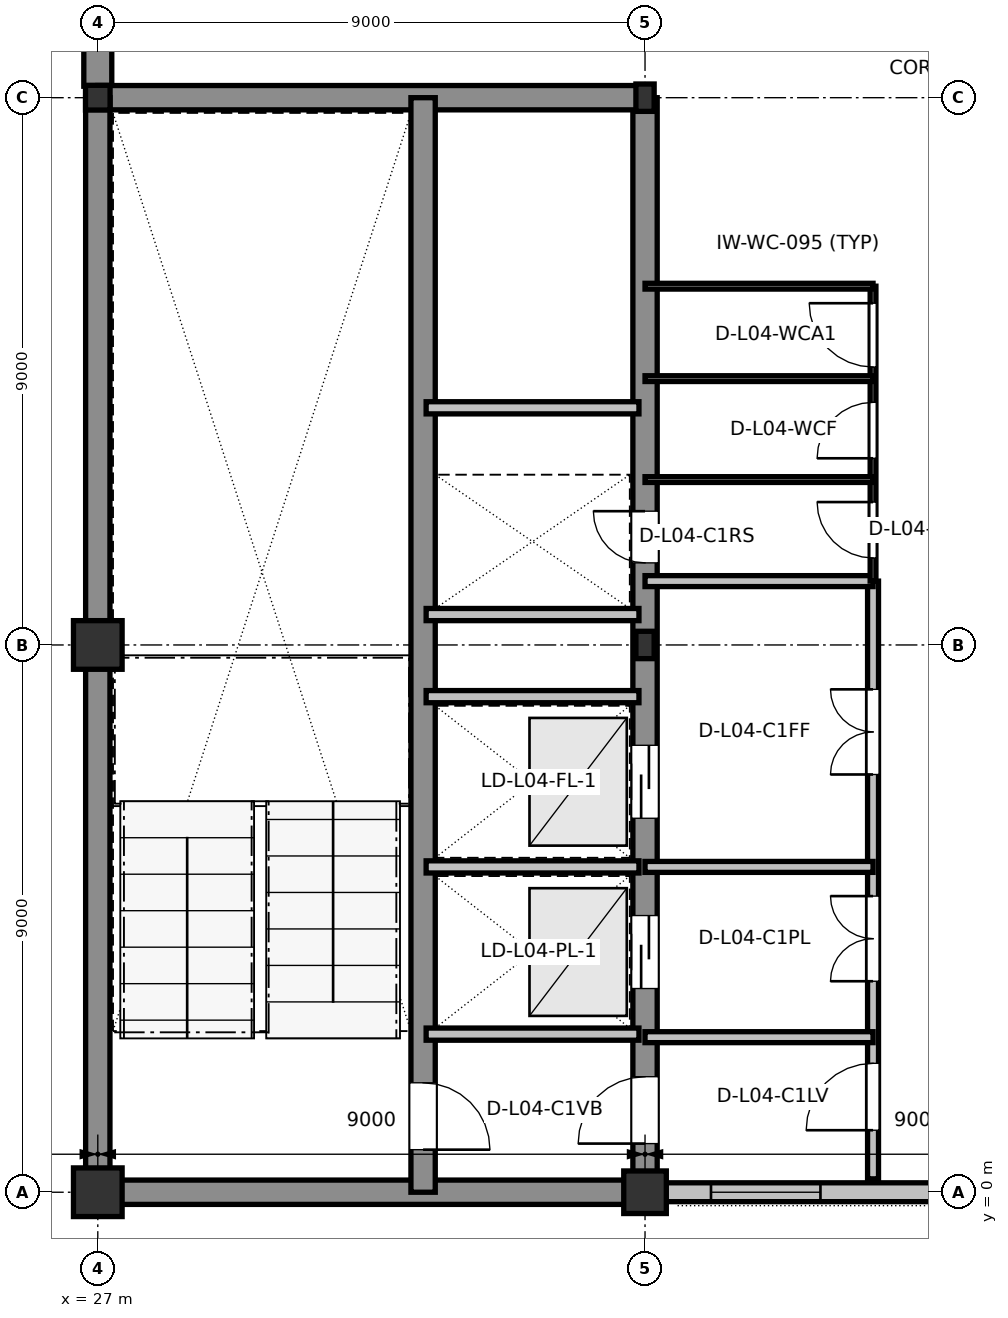
"""IFC4 building model, lengths in metres.
Left out: names, types, materials, properties, quantities, classifications, styles, units other than length and angle.
Written with IfcOpenShell. Run it as: python <this file> out.ifc"""

import sys

from ifc_helpers import new_model, si_unit, direction, frame, frame_2d, origin, origin_2d, place, context, subcontext, project, spatial, rectangle, i_section, extrude, element, fill, save


model = new_model("IFC4")
c1 = context("Model", 3, precision=1e-05, world=origin(), true_north=direction((0.0, 1.0)))
c2 = subcontext(c1, "Body", "Model", "MODEL_VIEW")
j1 = project(units=[si_unit("LENGTHUNIT", "METRE"), si_unit("PLANEANGLEUNIT", "RADIAN")], contexts=[c1])
p1 = place(None, origin())
s1 = spatial("IfcSite", under=j1, at=p1, CompositionType="ELEMENT")
p2 = place(p1, origin())
s2 = spatial("IfcBuilding", under=s1, at=p2, CompositionType="ELEMENT")
p3 = place(p2, frame((0.0, 0.0, 19.2)))
s3 = spatial("IfcBuildingStorey", under=s2, at=p3, CompositionType="ELEMENT", Elevation=19.2)
for number, where, z_axis, x_axis in (
    (1, (27.0, 0.0, 0.0), (0.0, 0.0, 1.0), (1.0, 0.0, 0.0)),
    (2, (27.0, 9.0, 0.0), (0.0, 0.0, 1.0), (1.0, 0.0, 0.0)),
):
    element("IfcColumn", number, at=place(p3, frame(where, z_axis=z_axis, x_axis=x_axis)), inside=s3, PredefinedType="COLUMN", context=c2, shape_type="SweptSolid", body=[
        extrude(rectangle(XDim=0.8, YDim=0.8, at=origin_2d()), origin(), (0.0, 0.0, 1.0), 4.2),
    ])
p4 = place(p3, frame((27.0, 18.0, 0.0), z_axis=(0.0, 0.0, 1.0), x_axis=(1.0, 0.0, 0.0)))
e3 = element("IfcColumn", 3, at=p4, inside=s3, PredefinedType="COLUMN", context=c2, shape_type="SweptSolid", body=[
    extrude(i_section(OverallWidth=0.404, OverallDepth=0.407, WebThickness=0.018, FlangeThickness=0.027, at=origin_2d()), origin(), (0.0, 0.0, 1.0), 4.2),
])
p5 = place(p3, frame((36.0, 0.0, 0.0), z_axis=(0.0, 0.0, 1.0), x_axis=(1.0, 0.0, 0.0)))
e4 = element("IfcColumn", 4, at=p5, inside=s3, PredefinedType="COLUMN", context=c2, shape_type="SweptSolid", body=[
    extrude(rectangle(XDim=0.7, YDim=0.7, at=origin_2d()), origin(), (0.0, 0.0, 1.0), 4.2),
])
for number, where, z_axis, x_axis in (
    (5, (36.0, 9.0, 0.0), (0.0, 0.0, 1.0), (1.0, 0.0, 0.0)),
    (6, (36.0, 18.0, 0.0), (0.0, 0.0, 1.0), (1.0, 0.0, 0.0)),
):
    element("IfcColumn", number, at=place(p3, frame(where, z_axis=z_axis, x_axis=x_axis)), inside=s3, PredefinedType="COLUMN", context=c2, shape_type="SweptSolid", body=[
        extrude(i_section(OverallWidth=0.3, OverallDepth=0.45, WebThickness=0.014, FlangeThickness=0.026, at=origin_2d()), origin(), (0.0, 0.0, 1.0), 4.2),
    ])
p6 = place(p3, frame((27.0, 21.075, 0.0), z_axis=(0.0, 0.0, 1.0), x_axis=(0.0, -1.0, 0.0)))
e7 = element("IfcWall", 7, at=p6, inside=s3, PredefinedType="STANDARD", context=c2, shape_type="SweptSolid", body=[
    extrude(rectangle(XDim=2.886, YDim=0.46, at=frame_2d((1.443, 0.0))), origin(), (0.0, 0.0, 1.0), 3.635),
])
p7 = place(p3, frame((36.335, 0.0, 0.0), z_axis=(0.0, 0.0, 1.0), x_axis=(1.0, 0.0, 0.0)))
e8 = element("IfcWall", 8, at=p7, inside=s3, PredefinedType="STANDARD", context=c2, shape_type="SweptSolid", body=[
    extrude(rectangle(XDim=8.33, YDim=0.31, at=frame_2d((4.165, 0.0))), origin(), (0.0, 0.0, 1.0), 3.635),
])
p8 = place(p7, frame((0.75, 0.0, 0.9)))
e9 = element("IfcOpeningElement", 9, at=p8, cuts=e8, PredefinedType="OPENING", context=c2, shape_type="SweptSolid", body=[
    extrude(rectangle(XDim=1.8, YDim=2.1, at=frame_2d((0.9, 1.05))), frame((0.0, 0.165, 0.0), z_axis=(0.0, -1.0, 0.0), x_axis=(1.0, 0.0, 0.0)), (0.0, 0.0, 1.0), 0.33),
])
p9 = place(p3, frame((27.0, 0.0, 0.0), z_axis=(0.0, 0.0, 1.0), x_axis=(1.0, 0.0, 0.0)))
e10 = element("IfcWall", 10, at=p9, inside=s3, PredefinedType="SHEAR", context=c2, shape_type="SweptSolid", body=[
    extrude(rectangle(XDim=9.0, YDim=0.4, at=frame_2d((4.5, 0.0))), origin(), (0.0, 0.0, 1.0), 3.96),
])
p10 = place(p3, frame((36.0, 0.0, 0.0), z_axis=(0.0, 0.0, 1.0), x_axis=(0.0, 1.0, 0.0)))
e11 = element("IfcWall", 11, at=p10, inside=s3, PredefinedType="SHEAR", context=c2, shape_type="SweptSolid", body=[
    extrude(rectangle(XDim=18.0, YDim=0.4, at=frame_2d((9.0, 0.0))), origin(), (0.0, 0.0, 1.0), 3.96),
])
p11 = place(p10, frame((0.8, 0.0, 0.0)))
e12 = element("IfcOpeningElement", 12, at=p11, cuts=e11, PredefinedType="OPENING", context=c2, shape_type="SweptSolid", body=[
    extrude(rectangle(XDim=1.1, YDim=2.16, at=frame_2d((0.55, 1.08))), frame((0.0, 0.21, 0.0), z_axis=(0.0, -1.0, 0.0), x_axis=(1.0, 0.0, 0.0)), (0.0, 0.0, 1.0), 0.42),
])
p12 = place(p10, frame((3.35, 0.0, 0.0)))
e13 = element("IfcOpeningElement", 13, at=p12, cuts=e11, PredefinedType="OPENING", context=c2, shape_type="SweptSolid", body=[
    extrude(rectangle(XDim=1.2, YDim=2.2, at=frame_2d((0.6, 1.1))), frame((0.0, 0.21, 0.0), z_axis=(0.0, -1.0, 0.0), x_axis=(1.0, 0.0, 0.0)), (0.0, 0.0, 1.0), 0.42),
])
p13 = place(p10, frame((6.15, 0.0, 0.0)))
e14 = element("IfcOpeningElement", 14, at=p13, cuts=e11, PredefinedType="OPENING", context=c2, shape_type="SweptSolid", body=[
    extrude(rectangle(XDim=1.2, YDim=2.2, at=frame_2d((0.6, 1.1))), frame((0.0, 0.21, 0.0), z_axis=(0.0, -1.0, 0.0), x_axis=(1.0, 0.0, 0.0)), (0.0, 0.0, 1.0), 0.42),
])
p14 = place(p10, frame((10.35, 0.0, 0.0)))
e15 = element("IfcOpeningElement", 15, at=p14, cuts=e11, PredefinedType="OPENING", context=c2, shape_type="SweptSolid", body=[
    extrude(rectangle(XDim=0.85, YDim=2.1, at=frame_2d((0.425, 1.05))), frame((0.0, 0.21, 0.0), z_axis=(0.0, -1.0, 0.0), x_axis=(1.0, 0.0, 0.0)), (0.0, 0.0, 1.0), 0.42),
])
p15 = place(p3, frame((36.0, 18.0, 0.0), z_axis=(0.0, 0.0, 1.0), x_axis=(-1.0, 0.0, 0.0)))
e16 = element("IfcWall", 16, at=p15, inside=s3, PredefinedType="SHEAR", context=c2, shape_type="SweptSolid", body=[
    extrude(rectangle(XDim=9.0, YDim=0.4, at=frame_2d((4.5, 0.0))), origin(), (0.0, 0.0, 1.0), 3.96),
])
p16 = place(p3, frame((27.0, 18.0, 0.0), z_axis=(0.0, 0.0, 1.0), x_axis=(0.0, -1.0, 0.0)))
e17 = element("IfcWall", 17, at=p16, inside=s3, PredefinedType="SHEAR", context=c2, shape_type="SweptSolid", body=[
    extrude(rectangle(XDim=18.0, YDim=0.4, at=frame_2d((9.0, 0.0))), origin(), (0.0, 0.0, 1.0), 3.96),
])
p17 = place(p3, frame((32.35, 0.0, 0.0), z_axis=(0.0, 0.0, 1.0), x_axis=(0.0, 1.0, 0.0)))
e18 = element("IfcWall", 18, at=p17, inside=s3, PredefinedType="SHEAR", context=c2, shape_type="SweptSolid", body=[
    extrude(rectangle(XDim=18.0, YDim=0.4, at=frame_2d((9.0, 0.0))), origin(), (0.0, 0.0, 1.0), 3.96),
])
p18 = place(p17, frame((0.7, 0.0, 0.0)))
e19 = element("IfcOpeningElement", 19, at=p18, cuts=e18, PredefinedType="OPENING", context=c2, shape_type="SweptSolid", body=[
    extrude(rectangle(XDim=1.1, YDim=2.16, at=frame_2d((0.55, 1.08))), frame((0.0, 0.21, 0.0), z_axis=(0.0, -1.0, 0.0), x_axis=(1.0, 0.0, 0.0)), (0.0, 0.0, 1.0), 0.42),
])
for number, where, z_axis, x_axis in (
    (20, (32.4, 2.6, 0.0), (0.0, 0.0, 1.0), (1.0, 0.0, 0.0)),
    (21, (32.4, 5.35, 0.0), (0.0, 0.0, 1.0), (1.0, 0.0, 0.0)),
    (22, (32.4, 8.15, 0.0), (0.0, 0.0, 1.0), (1.0, 0.0, 0.0)),
    (23, (32.4, 9.5, 0.0), (0.0, 0.0, 1.0), (1.0, 0.0, 0.0)),
    (24, (32.4, 12.9, 0.0), (0.0, 0.0, 1.0), (1.0, 0.0, 0.0)),
):
    element("IfcWall", number, at=place(p3, frame(where, z_axis=z_axis, x_axis=x_axis)), inside=s3, PredefinedType="PARTITIONING", context=c2, shape_type="SweptSolid", body=[
        extrude(rectangle(XDim=3.5, YDim=0.2, at=frame_2d((1.75, 0.0))), origin(), (0.0, 0.0, 1.0), 3.96),
    ])
p19 = place(p3, frame((39.75, 0.22, 0.0), z_axis=(0.0, 0.0, 1.0), x_axis=(0.0, 1.0, 0.0)))
e25 = element("IfcWall", 25, at=p19, inside=s3, PredefinedType="PARTITIONING", context=c2, shape_type="SweptSolid", body=[
    extrude(rectangle(XDim=9.83, YDim=0.18, at=frame_2d((4.915, 0.0))), origin(), (0.0, 0.0, 1.0), 3.96),
])
p20 = place(p19, frame((0.8, 0.0, 0.0)))
e26 = element("IfcOpeningElement", 26, at=p20, cuts=e25, PredefinedType="OPENING", context=c2, shape_type="SweptSolid", body=[
    extrude(rectangle(XDim=1.1, YDim=2.16, at=frame_2d((0.55, 1.08))), frame((0.0, 0.1, 0.0), z_axis=(0.0, -1.0, 0.0), x_axis=(1.0, 0.0, 0.0)), (0.0, 0.0, 1.0), 0.2),
])
p21 = place(p19, frame((3.25, 0.0, 0.0)))
e27 = element("IfcOpeningElement", 27, at=p21, cuts=e25, PredefinedType="OPENING", context=c2, shape_type="SweptSolid", body=[
    extrude(rectangle(XDim=1.4, YDim=2.2, at=frame_2d((0.7, 1.1))), frame((0.0, 0.1, 0.0), z_axis=(0.0, -1.0, 0.0), x_axis=(1.0, 0.0, 0.0)), (0.0, 0.0, 1.0), 0.2),
])
p22 = place(p19, frame((6.65, 0.0, 0.0)))
e28 = element("IfcOpeningElement", 28, at=p22, cuts=e25, PredefinedType="OPENING", context=c2, shape_type="SweptSolid", body=[
    extrude(rectangle(XDim=1.4, YDim=2.2, at=frame_2d((0.7, 1.1))), frame((0.0, 0.1, 0.0), z_axis=(0.0, -1.0, 0.0), x_axis=(1.0, 0.0, 0.0)), (0.0, 0.0, 1.0), 0.2),
])
for number, where, z_axis, x_axis in (
    (29, (36.0, 2.55, 0.0), (0.0, 0.0, 1.0), (1.0, 0.0, 0.0)),
    (30, (36.0, 5.35, 0.0), (0.0, 0.0, 1.0), (1.0, 0.0, 0.0)),
    (31, (36.0, 10.05, 0.0), (0.0, 0.0, 1.0), (1.0, 0.0, 0.0)),
):
    element("IfcWall", number, at=place(p3, frame(where, z_axis=z_axis, x_axis=x_axis)), inside=s3, PredefinedType="PARTITIONING", context=c2, shape_type="SweptSolid", body=[
        extrude(rectangle(XDim=3.75, YDim=0.18, at=frame_2d((1.875, 0.0))), origin(), (0.0, 0.0, 1.0), 3.96),
    ])
p23 = place(p3, frame((39.75, 10.05, 0.0), z_axis=(0.0, 0.0, 1.0), x_axis=(0.0, 1.0, 0.0)))
e32 = element("IfcWall", 32, at=p23, inside=s3, PredefinedType="PARTITIONING", context=c2, shape_type="SweptSolid", body=[
    extrude(rectangle(XDim=4.85, YDim=0.095, at=frame_2d((2.425, 0.0))), origin(), (0.0, 0.0, 1.0), 3.96),
])
p24 = place(p23, frame((0.38, 0.0, 0.0)))
e33 = element("IfcOpeningElement", 33, at=p24, cuts=e32, PredefinedType="OPENING", context=c2, shape_type="SweptSolid", body=[
    extrude(rectangle(XDim=0.92, YDim=2.1, at=frame_2d((0.46, 1.05))), frame((0.0, 0.057, 0.0), z_axis=(0.0, -1.0, 0.0), x_axis=(1.0, 0.0, 0.0)), (0.0, 0.0, 1.0), 0.115),
])
p25 = place(p23, frame((2.02, 0.0, 0.0)))
e34 = element("IfcOpeningElement", 34, at=p25, cuts=e32, PredefinedType="OPENING", context=c2, shape_type="SweptSolid", body=[
    extrude(rectangle(XDim=0.92, YDim=2.1, at=frame_2d((0.46, 1.05))), frame((0.0, 0.057, 0.0), z_axis=(0.0, -1.0, 0.0), x_axis=(1.0, 0.0, 0.0)), (0.0, 0.0, 1.0), 0.115),
])
p26 = place(p23, frame((3.52, 0.0, 0.0)))
e35 = element("IfcOpeningElement", 35, at=p26, cuts=e32, PredefinedType="OPENING", context=c2, shape_type="SweptSolid", body=[
    extrude(rectangle(XDim=1.05, YDim=2.13, at=frame_2d((0.525, 1.065))), frame((0.0, 0.057, 0.0), z_axis=(0.0, -1.0, 0.0), x_axis=(1.0, 0.0, 0.0)), (0.0, 0.0, 1.0), 0.115),
])
for number, where, z_axis, x_axis in (
    (36, (36.0, 11.72, 0.0), (0.0, 0.0, 1.0), (1.0, 0.0, 0.0)),
    (37, (36.0, 13.38, 0.0), (0.0, 0.0, 1.0), (1.0, 0.0, 0.0)),
):
    element("IfcWall", number, at=place(p3, frame(where, z_axis=z_axis, x_axis=x_axis)), inside=s3, PredefinedType="PARTITIONING", context=c2, shape_type="SweptSolid", body=[
        extrude(rectangle(XDim=3.75, YDim=0.095, at=frame_2d((1.875, 0.0))), origin(), (0.0, 0.0, 1.0), 3.96),
    ])
p27 = place(p3, frame((36.0, 14.9, 0.0), z_axis=(0.0, 0.0, 1.0), x_axis=(1.0, 0.0, 0.0)))
e38 = element("IfcWall", 38, at=p27, inside=s3, PredefinedType="PARTITIONING", context=c2, shape_type="SweptSolid", body=[
    extrude(rectangle(XDim=3.75, YDim=0.095, at=frame_2d((1.875, 0.0))), origin(), (0.0, 0.0, 1.0), 3.675),
])
p28 = place(p8, origin())
e39 = element("IfcWindow", 39, at=p28, inside=s3, PartitioningType="SINGLE_PANEL", PredefinedType="WINDOW", context=c2, shape_type="SweptSolid", body=[
    extrude(rectangle(XDim=1.8, YDim=2.1, at=frame_2d((0.9, 1.05))), frame((0.0, 0.03, 0.0), z_axis=(0.0, -1.0, 0.0), x_axis=(1.0, 0.0, 0.0)), (0.0, 0.0, 1.0), 0.06),
])
fill(e9, e39)
p29 = place(p18, frame((1.1, 0.0, 0.0), z_axis=(0.0, 0.0, 1.0), x_axis=(-1.0, 0.0, 0.0)))
e40 = element("IfcDoor", 40, at=p29, inside=s3, OperationType="SINGLE_SWING_RIGHT", PredefinedType="DOOR", context=c2, shape_type="SweptSolid", body=[
    extrude(rectangle(XDim=1.1, YDim=2.16, at=frame_2d((0.55, 1.08))), frame((0.0, 0.025, 0.0), z_axis=(0.0, -1.0, 0.0), x_axis=(1.0, 0.0, 0.0)), (0.0, 0.0, 1.0), 0.05),
])
fill(e19, e40)
p30 = place(p11, origin())
e41 = element("IfcDoor", 41, at=p30, inside=s3, OperationType="SINGLE_SWING_LEFT", PredefinedType="DOOR", context=c2, shape_type="SweptSolid", body=[
    extrude(rectangle(XDim=1.1, YDim=2.16, at=frame_2d((0.55, 1.08))), frame((0.0, 0.025, 0.0), z_axis=(0.0, -1.0, 0.0), x_axis=(1.0, 0.0, 0.0)), (0.0, 0.0, 1.0), 0.05),
])
fill(e12, e41)
p31 = place(p12, origin())
e42 = element("IfcDoor", 42, at=p31, inside=s3, OperationType="SLIDING_TO_LEFT", PredefinedType="DOOR", context=c2, shape_type="SweptSolid", body=[
    extrude(rectangle(XDim=1.2, YDim=2.2, at=frame_2d((0.6, 1.1))), frame((0.0, 0.025, 0.0), z_axis=(0.0, -1.0, 0.0), x_axis=(1.0, 0.0, 0.0)), (0.0, 0.0, 1.0), 0.05),
])
fill(e13, e42)
p32 = place(p13, origin())
e43 = element("IfcDoor", 43, at=p32, inside=s3, OperationType="SLIDING_TO_LEFT", PredefinedType="DOOR", context=c2, shape_type="SweptSolid", body=[
    extrude(rectangle(XDim=1.2, YDim=2.2, at=frame_2d((0.6, 1.1))), frame((0.0, 0.025, 0.0), z_axis=(0.0, -1.0, 0.0), x_axis=(1.0, 0.0, 0.0)), (0.0, 0.0, 1.0), 0.05),
])
fill(e14, e43)
p33 = place(p14, origin())
e44 = element("IfcDoor", 44, at=p33, inside=s3, OperationType="SINGLE_SWING_RIGHT", PredefinedType="DOOR", context=c2, shape_type="SweptSolid", body=[
    extrude(rectangle(XDim=0.85, YDim=2.1, at=frame_2d((0.425, 1.05))), frame((0.0, 0.025, 0.0), z_axis=(0.0, -1.0, 0.0), x_axis=(1.0, 0.0, 0.0)), (0.0, 0.0, 1.0), 0.05),
])
fill(e15, e44)
p34 = place(p20, origin())
e45 = element("IfcDoor", 45, at=p34, inside=s3, OperationType="SINGLE_SWING_LEFT", PredefinedType="DOOR", context=c2, shape_type="SweptSolid", body=[
    extrude(rectangle(XDim=1.1, YDim=2.16, at=frame_2d((0.55, 1.08))), frame((0.0, 0.025, 0.0), z_axis=(0.0, -1.0, 0.0), x_axis=(1.0, 0.0, 0.0)), (0.0, 0.0, 1.0), 0.05),
])
fill(e26, e45)
p35 = place(p21, origin())
e46 = element("IfcDoor", 46, at=p35, inside=s3, OperationType="DOUBLE_DOOR_SINGLE_SWING", PredefinedType="DOOR", context=c2, shape_type="SweptSolid", body=[
    extrude(rectangle(XDim=1.4, YDim=2.2, at=frame_2d((0.7, 1.1))), frame((0.0, 0.025, 0.0), z_axis=(0.0, -1.0, 0.0), x_axis=(1.0, 0.0, 0.0)), (0.0, 0.0, 1.0), 0.05),
])
fill(e27, e46)
p36 = place(p22, origin())
e47 = element("IfcDoor", 47, at=p36, inside=s3, OperationType="DOUBLE_DOOR_SINGLE_SWING", PredefinedType="DOOR", context=c2, shape_type="SweptSolid", body=[
    extrude(rectangle(XDim=1.4, YDim=2.2, at=frame_2d((0.7, 1.1))), frame((0.0, 0.025, 0.0), z_axis=(0.0, -1.0, 0.0), x_axis=(1.0, 0.0, 0.0)), (0.0, 0.0, 1.0), 0.05),
])
fill(e28, e47)
p37 = place(p24, origin())
e48 = element("IfcDoor", 48, at=p37, inside=s3, OperationType="SINGLE_SWING_RIGHT", PredefinedType="DOOR", context=c2, shape_type="SweptSolid", body=[
    extrude(rectangle(XDim=0.92, YDim=2.1, at=frame_2d((0.46, 1.05))), frame((0.0, 0.025, 0.0), z_axis=(0.0, -1.0, 0.0), x_axis=(1.0, 0.0, 0.0)), (0.0, 0.0, 1.0), 0.05),
])
fill(e33, e48)
p38 = place(p25, origin())
e49 = element("IfcDoor", 49, at=p38, inside=s3, OperationType="SINGLE_SWING_LEFT", PredefinedType="DOOR", context=c2, shape_type="SweptSolid", body=[
    extrude(rectangle(XDim=0.92, YDim=2.1, at=frame_2d((0.46, 1.05))), frame((0.0, 0.025, 0.0), z_axis=(0.0, -1.0, 0.0), x_axis=(1.0, 0.0, 0.0)), (0.0, 0.0, 1.0), 0.05),
])
fill(e34, e49)
p39 = place(p26, origin())
e50 = element("IfcDoor", 50, at=p39, inside=s3, OperationType="SINGLE_SWING_RIGHT", PredefinedType="DOOR", context=c2, shape_type="SweptSolid", body=[
    extrude(rectangle(XDim=1.05, YDim=2.13, at=frame_2d((0.525, 1.065))), frame((0.0, 0.025, 0.0), z_axis=(0.0, -1.0, 0.0), x_axis=(1.0, 0.0, 0.0)), (0.0, 0.0, 1.0), 0.05),
])
fill(e35, e50)
save(model, sys.argv[1])
